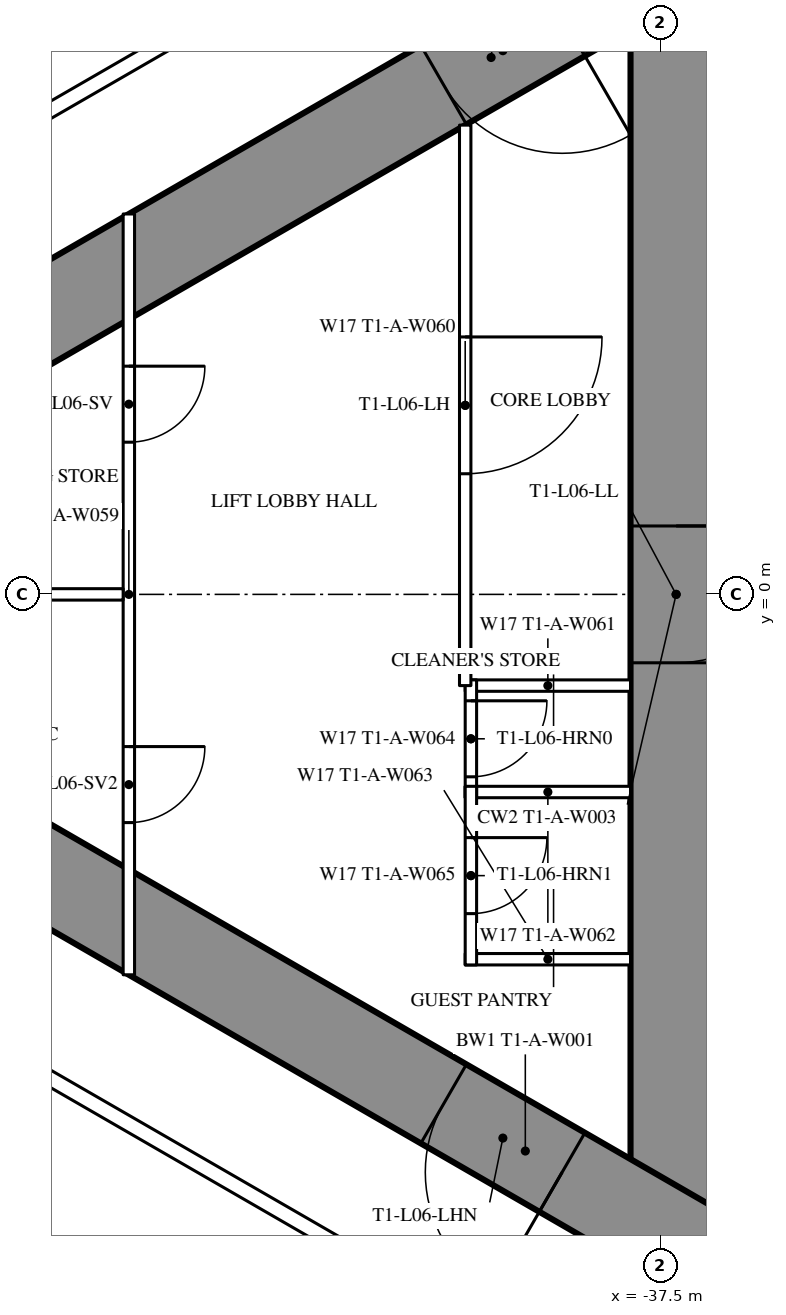
"""IFC4 building model, lengths in metres.
Left out: names, types, materials, properties, quantities, classifications, styles, units other than length and angle.
Written with IfcOpenShell. Run it as: python <this file> out.ifc"""

import sys

from ifc_helpers import new_model, si_unit, direction, frame, frame_2d, origin, place, context, subcontext, project, spatial, rectangle, extrude, element, fill, save


model = new_model("IFC4")
c1 = context("Model", 3, precision=1e-05, world=origin(), true_north=direction((0.0, 1.0)))
c2 = subcontext(c1, "Body", "Model", "MODEL_VIEW")
j1 = project(units=[si_unit("LENGTHUNIT", "METRE"), si_unit("PLANEANGLEUNIT", "RADIAN")], contexts=[c1])
p1 = place(None, origin())
s1 = spatial("IfcSite", under=j1, at=p1, CompositionType="ELEMENT")
p2 = place(p1, origin())
s2 = spatial("IfcBuilding", under=s1, at=p2, CompositionType="ELEMENT")
p3 = place(p2, frame((0.0, 0.0, 28.5)))
s3 = spatial("IfcBuildingStorey", under=s2, at=p3, CompositionType="ELEMENT", Elevation=28.5)
p4 = place(p3, frame((-37.3, 8.6, 0.0), z_axis=(0.0, 0.0, 1.0), x_axis=(0.0, -1.0, 0.0)))
e1 = element("IfcWall", 1, at=p4, inside=s3, PredefinedType="SHEAR", context=c2, shape_type="SweptSolid", body=[
    extrude(rectangle(XDim=17.2, YDim=1.2, at=frame_2d((8.6, 0.0))), origin(), (0.0, 0.0, 1.0), 3.5),
])
p5 = place(p4, frame((7.7, 0.0, 0.0)))
e2 = element("IfcOpeningElement", 2, at=p5, cuts=e1, PredefinedType="OPENING", context=c2, shape_type="SweptSolid", body=[
    extrude(rectangle(XDim=1.8, YDim=2.2, at=frame_2d((0.9, 1.1))), frame((0.0, 0.61, 0.0), z_axis=(0.0, -1.0, 0.0), x_axis=(1.0, 0.0, 0.0)), (0.0, 0.0, 1.0), 1.22),
])
p6 = place(p3, frame((-27.2, 14.3, 0.0), z_axis=(0.0, 0.0, 1.0), x_axis=(-0.866026593062, -0.499997940104, 0.0)))
e3 = element("IfcWall", 3, at=p6, inside=s3, PredefinedType="SHEAR", context=c2, shape_type="SweptSolid", body=[
    extrude(rectangle(XDim=28.946, YDim=1.2, at=frame_2d((14.473, 0.0))), origin(), (0.0, 0.0, 1.0), 3.5),
])
p7 = place(p6, frame((4.6, 0.0, 0.0)))
e4 = element("IfcOpeningElement", 4, at=p7, cuts=e3, PredefinedType="OPENING", context=c2, shape_type="SweptSolid", body=[
    extrude(rectangle(XDim=1.0, YDim=2.2, at=frame_2d((0.5, 1.1))), frame((0.0, 0.61, 0.0), z_axis=(0.0, -1.0, 0.0), x_axis=(1.0, 0.0, 0.0)), (0.0, 0.0, 1.0), 1.22),
])
p8 = place(p6, frame((13.395, 0.0, 0.0)))
e5 = element("IfcOpeningElement", 5, at=p8, cuts=e3, PredefinedType="OPENING", context=c2, shape_type="SweptSolid", body=[
    extrude(rectangle(XDim=1.8, YDim=2.2, at=frame_2d((0.9, 1.1))), frame((0.0, 0.61, 0.0), z_axis=(0.0, -1.0, 0.0), x_axis=(1.0, 0.0, 0.0)), (0.0, 0.0, 1.0), 1.22),
])
p9 = place(p3, frame((-27.2, -14.3, 0.0), z_axis=(0.0, 0.0, 1.0), x_axis=(-0.866024021859, 0.500002393557, 0.0)))
e6 = element("IfcWall", 6, at=p9, inside=s3, PredefinedType="SHEAR", context=c2, shape_type="SweptSolid", body=[
    extrude(rectangle(XDim=27.907, YDim=1.2, at=frame_2d((13.954, 0.0))), origin(), (0.0, 0.0, 1.0), 3.5),
])
p10 = place(p9, frame((4.6, 0.0, 0.0)))
e7 = element("IfcOpeningElement", 7, at=p10, cuts=e6, PredefinedType="OPENING", context=c2, shape_type="SweptSolid", body=[
    extrude(rectangle(XDim=1.0, YDim=2.2, at=frame_2d((0.5, 1.1))), frame((0.0, 0.61, 0.0), z_axis=(0.0, -1.0, 0.0), x_axis=(1.0, 0.0, 0.0)), (0.0, 0.0, 1.0), 1.22),
])
p11 = place(p9, frame((13.395, 0.0, 0.0)))
e8 = element("IfcOpeningElement", 8, at=p11, cuts=e6, PredefinedType="OPENING", context=c2, shape_type="SweptSolid", body=[
    extrude(rectangle(XDim=1.8, YDim=2.2, at=frame_2d((0.9, 1.1))), frame((0.0, 0.61, 0.0), z_axis=(0.0, -1.0, 0.0), x_axis=(1.0, 0.0, 0.0)), (0.0, 0.0, 1.0), 1.22),
])
p12 = place(p3, frame((-37.7, 10.894, 0.0), z_axis=(0.0, 0.0, 1.0), x_axis=(-0.866027905338, -0.499995667157, 0.0)))
e9 = element("IfcWall", 9, at=p12, inside=s3, PredefinedType="PARTITIONING", context=c2, shape_type="SweptSolid", body=[
    extrude(rectangle(XDim=21.787, YDim=0.2, at=frame_2d((10.894, 0.0))), origin(), (0.0, 0.0, 1.0), 3.25),
])
p13 = place(p12, frame((16.008, 0.0, 0.0)))
e10 = element("IfcOpeningElement", 10, at=p13, cuts=e9, PredefinedType="OPENING", context=c2, shape_type="SweptSolid", body=[
    extrude(rectangle(XDim=0.95, YDim=2.2, at=frame_2d((0.475, 1.1))), frame((0.0, 0.11, 0.0), z_axis=(0.0, -1.0, 0.0), x_axis=(1.0, 0.0, 0.0)), (0.0, 0.0, 1.0), 0.22),
])
p14 = place(p12, frame((20.058, 0.0, 0.0)))
e11 = element("IfcOpeningElement", 11, at=p14, cuts=e9, PredefinedType="OPENING", context=c2, shape_type="SweptSolid", body=[
    extrude(rectangle(XDim=0.95, YDim=2.2, at=frame_2d((0.475, 1.1))), frame((0.0, 0.11, 0.0), z_axis=(0.0, -1.0, 0.0), x_axis=(1.0, 0.0, 0.0)), (0.0, 0.0, 1.0), 0.22),
])
p15 = place(p12, frame((2.95, 0.0, 0.0)))
e12 = element("IfcOpeningElement", 12, at=p15, cuts=e9, PredefinedType="OPENING", context=c2, shape_type="SweptSolid", body=[
    extrude(rectangle(XDim=0.95, YDim=2.2, at=frame_2d((0.475, 1.1))), frame((0.0, 0.11, 0.0), z_axis=(0.0, -1.0, 0.0), x_axis=(1.0, 0.0, 0.0)), (0.0, 0.0, 1.0), 0.22),
])
p16 = place(p3, frame((-36.92, -11.344, 0.0), z_axis=(0.0, 0.0, 1.0), x_axis=(-0.866028313256, 0.499994960614, 0.0)))
e13 = element("IfcWall", 13, at=p16, inside=s3, PredefinedType="PARTITIONING", context=c2, shape_type="SweptSolid", body=[
    extrude(rectangle(XDim=22.568, YDim=0.2, at=frame_2d((11.284, 0.0))), origin(), (0.0, 0.0, 1.0), 3.25),
])
p17 = place(p16, frame((12.68, 0.0, 0.0)))
e14 = element("IfcOpeningElement", 14, at=p17, cuts=e13, PredefinedType="OPENING", context=c2, shape_type="SweptSolid", body=[
    extrude(rectangle(XDim=0.95, YDim=2.2, at=frame_2d((0.475, 1.1))), frame((0.0, 0.11, 0.0), z_axis=(0.0, -1.0, 0.0), x_axis=(1.0, 0.0, 0.0)), (0.0, 0.0, 1.0), 0.22),
])
p18 = place(p16, frame((3.35, 0.0, 0.0)))
e15 = element("IfcOpeningElement", 15, at=p18, cuts=e13, PredefinedType="OPENING", context=c2, shape_type="SweptSolid", body=[
    extrude(rectangle(XDim=1.0, YDim=2.2, at=frame_2d((0.5, 1.1))), frame((0.0, 0.11, 0.0), z_axis=(0.0, -1.0, 0.0), x_axis=(1.0, 0.0, 0.0)), (0.0, 0.0, 1.0), 0.22),
])
for number, where, z_axis, x_axis in (
    (16, (-37.9, -1.2, 0.0), (0.0, 0.0, 1.0), (-1.0, 0.0, 0.0)),
    (17, (-37.9, -2.6, 0.0), (0.0, 0.0, 1.0), (-1.0, 0.0, 0.0)),
    (18, (-37.9, -4.8, 0.0), (0.0, 0.0, 1.0), (-1.0, 0.0, 0.0)),
):
    element("IfcWall", number, at=place(p3, frame(where, z_axis=z_axis, x_axis=x_axis)), inside=s3, PredefinedType="PARTITIONING", context=c2, shape_type="SweptSolid", body=[
        extrude(rectangle(XDim=2.175, YDim=0.15, at=frame_2d((1.087, 0.0))), origin(), (0.0, 0.0, 1.0), 3.25),
    ])
p19 = place(p3, frame((-40.0, -1.125, 0.0), z_axis=(0.0, 0.0, 1.0), x_axis=(0.0, -1.0, 0.0)))
e19 = element("IfcWall", 19, at=p19, inside=s3, PredefinedType="PARTITIONING", context=c2, shape_type="SweptSolid", body=[
    extrude(rectangle(XDim=1.55, YDim=0.15, at=frame_2d((0.775, 0.0))), origin(), (0.0, 0.0, 1.0), 3.25),
])
p20 = place(p19, frame((0.275, 0.0, 0.0)))
e20 = element("IfcOpeningElement", 20, at=p20, cuts=e19, PredefinedType="OPENING", context=c2, shape_type="SweptSolid", body=[
    extrude(rectangle(XDim=1.0, YDim=2.2, at=frame_2d((0.5, 1.1))), frame((0.0, 0.085, 0.0), z_axis=(0.0, -1.0, 0.0), x_axis=(1.0, 0.0, 0.0)), (0.0, 0.0, 1.0), 0.17),
])
p21 = place(p3, frame((-40.0, -2.525, 0.0), z_axis=(0.0, 0.0, 1.0), x_axis=(0.0, -1.0, 0.0)))
e21 = element("IfcWall", 21, at=p21, inside=s3, PredefinedType="PARTITIONING", context=c2, shape_type="SweptSolid", body=[
    extrude(rectangle(XDim=2.35, YDim=0.15, at=frame_2d((1.175, 0.0))), origin(), (0.0, 0.0, 1.0), 3.25),
])
p22 = place(p21, frame((0.675, 0.0, 0.0)))
e22 = element("IfcOpeningElement", 22, at=p22, cuts=e21, PredefinedType="OPENING", context=c2, shape_type="SweptSolid", body=[
    extrude(rectangle(XDim=1.0, YDim=2.2, at=frame_2d((0.5, 1.1))), frame((0.0, 0.085, 0.0), z_axis=(0.0, -1.0, 0.0), x_axis=(1.0, 0.0, 0.0)), (0.0, 0.0, 1.0), 0.17),
])
p23 = place(p3, frame((-40.075, 6.174, 0.0), z_axis=(0.0, 0.0, 1.0), x_axis=(0.0, -1.0, 0.0)))
e23 = element("IfcWall", 23, at=p23, inside=s3, PredefinedType="PARTITIONING", context=c2, shape_type="SweptSolid", body=[
    extrude(rectangle(XDim=7.374, YDim=0.15, at=frame_2d((3.687, 0.0))), origin(), (0.0, 0.0, 1.0), 3.25),
])
p24 = place(p23, frame((2.787, 0.0, 0.0)))
e24 = element("IfcOpeningElement", 24, at=p24, cuts=e23, PredefinedType="OPENING", context=c2, shape_type="SweptSolid", body=[
    extrude(rectangle(XDim=1.8, YDim=2.2, at=frame_2d((0.9, 1.1))), frame((0.0, 0.085, 0.0), z_axis=(0.0, -1.0, 0.0), x_axis=(1.0, 0.0, 0.0)), (0.0, 0.0, 1.0), 0.17),
])
p25 = place(p3, frame((-44.5, 5.005, 0.0), z_axis=(0.0, 0.0, 1.0), x_axis=(0.0, -1.0, 0.0)))
e25 = element("IfcWall", 25, at=p25, inside=s3, PredefinedType="PARTITIONING", context=c2, shape_type="SweptSolid", body=[
    extrude(rectangle(XDim=10.009, YDim=0.15, at=frame_2d((5.005, 0.0))), origin(), (0.0, 0.0, 1.0), 2.45),
])
p26 = place(p25, frame((2.002, 0.0, 0.0)))
e26 = element("IfcOpeningElement", 26, at=p26, cuts=e25, PredefinedType="OPENING", context=c2, shape_type="SweptSolid", body=[
    extrude(rectangle(XDim=1.0, YDim=2.2, at=frame_2d((0.5, 1.1))), frame((0.0, 0.085, 0.0), z_axis=(0.0, -1.0, 0.0), x_axis=(1.0, 0.0, 0.0)), (0.0, 0.0, 1.0), 0.17),
])
p27 = place(p25, frame((7.007, 0.0, 0.0)))
e27 = element("IfcOpeningElement", 27, at=p27, cuts=e25, PredefinedType="OPENING", context=c2, shape_type="SweptSolid", body=[
    extrude(rectangle(XDim=1.0, YDim=2.2, at=frame_2d((0.5, 1.1))), frame((0.0, 0.085, 0.0), z_axis=(0.0, -1.0, 0.0), x_axis=(1.0, 0.0, 0.0)), (0.0, 0.0, 1.0), 0.17),
])
p28 = place(p3, frame((-44.575, 0.0, 0.0), z_axis=(0.0, 0.0, 1.0), x_axis=(-1.0, 0.0, 0.0)))
e28 = element("IfcWall", 28, at=p28, inside=s3, PredefinedType="PARTITIONING", context=c2, shape_type="SweptSolid", body=[
    extrude(rectangle(XDim=8.593, YDim=0.15, at=frame_2d((4.297, 0.0))), origin(), (0.0, 0.0, 1.0), 2.25),
])
p29 = place(p20, origin())
e29 = element("IfcDoor", 29, at=p29, inside=s3, OperationType="SINGLE_SWING_LEFT", PredefinedType="DOOR", context=c2, shape_type="SweptSolid", body=[
    extrude(rectangle(XDim=1.0, YDim=2.2, at=frame_2d((0.5, 1.1))), frame((0.0, 0.025, 0.0), z_axis=(0.0, -1.0, 0.0), x_axis=(1.0, 0.0, 0.0)), (0.0, 0.0, 1.0), 0.05),
])
fill(e20, e29)
p30 = place(p22, origin())
e30 = element("IfcDoor", 30, at=p30, inside=s3, OperationType="SINGLE_SWING_LEFT", PredefinedType="DOOR", context=c2, shape_type="SweptSolid", body=[
    extrude(rectangle(XDim=1.0, YDim=2.2, at=frame_2d((0.5, 1.1))), frame((0.0, 0.025, 0.0), z_axis=(0.0, -1.0, 0.0), x_axis=(1.0, 0.0, 0.0)), (0.0, 0.0, 1.0), 0.05),
])
fill(e22, e30)
p31 = place(p24, origin())
e31 = element("IfcDoor", 31, at=p31, inside=s3, OperationType="DOUBLE_DOOR_SINGLE_SWING", PredefinedType="DOOR", context=c2, shape_type="SweptSolid", body=[
    extrude(rectangle(XDim=1.8, YDim=2.2, at=frame_2d((0.9, 1.1))), frame((0.0, 0.025, 0.0), z_axis=(0.0, -1.0, 0.0), x_axis=(1.0, 0.0, 0.0)), (0.0, 0.0, 1.0), 0.05),
])
fill(e24, e31)
p32 = place(p26, origin())
e32 = element("IfcDoor", 32, at=p32, inside=s3, OperationType="SINGLE_SWING_LEFT", PredefinedType="DOOR", context=c2, shape_type="SweptSolid", body=[
    extrude(rectangle(XDim=1.0, YDim=2.2, at=frame_2d((0.5, 1.1))), frame((0.0, 0.025, 0.0), z_axis=(0.0, -1.0, 0.0), x_axis=(1.0, 0.0, 0.0)), (0.0, 0.0, 1.0), 0.05),
])
fill(e26, e32)
p33 = place(p27, origin())
e33 = element("IfcDoor", 33, at=p33, inside=s3, OperationType="SINGLE_SWING_LEFT", PredefinedType="DOOR", context=c2, shape_type="SweptSolid", body=[
    extrude(rectangle(XDim=1.0, YDim=2.2, at=frame_2d((0.5, 1.1))), frame((0.0, 0.025, 0.0), z_axis=(0.0, -1.0, 0.0), x_axis=(1.0, 0.0, 0.0)), (0.0, 0.0, 1.0), 0.05),
])
fill(e27, e33)
p34 = place(p8, origin())
e34 = element("IfcDoor", 34, at=p34, inside=s3, OperationType="DOUBLE_DOOR_SINGLE_SWING", PredefinedType="DOOR", context=c2, shape_type="SweptSolid", body=[
    extrude(rectangle(XDim=1.8, YDim=2.2, at=frame_2d((0.9, 1.1))), frame((0.0, 0.025, 0.0), z_axis=(0.0, -1.0, 0.0), x_axis=(1.0, 0.0, 0.0)), (0.0, 0.0, 1.0), 0.05),
])
fill(e5, e34)
p35 = place(p11, origin())
e35 = element("IfcDoor", 35, at=p35, inside=s3, OperationType="DOUBLE_DOOR_SINGLE_SWING", PredefinedType="DOOR", context=c2, shape_type="SweptSolid", body=[
    extrude(rectangle(XDim=1.8, YDim=2.2, at=frame_2d((0.9, 1.1))), frame((0.0, 0.025, 0.0), z_axis=(0.0, -1.0, 0.0), x_axis=(1.0, 0.0, 0.0)), (0.0, 0.0, 1.0), 0.05),
])
fill(e8, e35)
p36 = place(p5, origin())
e36 = element("IfcDoor", 36, at=p36, inside=s3, OperationType="DOUBLE_DOOR_SINGLE_SWING", PredefinedType="DOOR", context=c2, shape_type="SweptSolid", body=[
    extrude(rectangle(XDim=1.8, YDim=2.2, at=frame_2d((0.9, 1.1))), frame((0.0, 0.025, 0.0), z_axis=(0.0, -1.0, 0.0), x_axis=(1.0, 0.0, 0.0)), (0.0, 0.0, 1.0), 0.05),
])
fill(e2, e36)
save(model, sys.argv[1])
